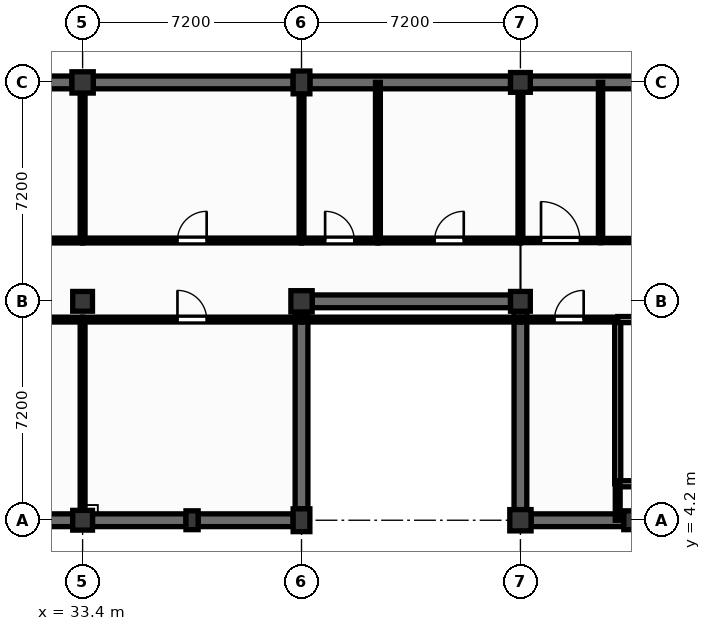
"""IFC4 building model, lengths in metres.
Left out: names, types, materials, properties, quantities, classifications, styles, units other than length and angle.
Written with IfcOpenShell. Run it as: python <this file> out.ifc"""

import sys

from ifc_helpers import new_model, si_unit, direction, frame, frame_2d, origin, origin_2d, place, context, subcontext, project, spatial, rectangle, extrude, element, fill, save


model = new_model("IFC4")
c1 = context("Model", 3, precision=1e-05, world=origin(), true_north=direction((0.0, 1.0)))
c2 = subcontext(c1, "Body", "Model", "MODEL_VIEW")
j1 = project(units=[si_unit("LENGTHUNIT", "METRE"), si_unit("PLANEANGLEUNIT", "RADIAN")], contexts=[c1])
p1 = place(None, origin())
s1 = spatial("IfcSite", under=j1, at=p1, CompositionType="ELEMENT")
p2 = place(p1, origin())
s2 = spatial("IfcBuilding", under=s1, at=p2, CompositionType="ELEMENT")
p3 = place(p2, frame((0.0, 0.0, -4.5)))
s3 = spatial("IfcBuildingStorey", under=s2, at=p3, CompositionType="ELEMENT", Elevation=-4.5)
for number, where, z_axis, x_axis in (
    (1, (33.4, 4.2, 0.0), (0.0, 0.0, 1.0), (1.0, 0.0, 0.0)),
    (2, (33.4, 11.4, 0.0), (0.0, 0.0, 1.0), (1.0, 0.0, 0.0)),
):
    element("IfcColumn", number, at=place(p3, frame(where, z_axis=z_axis, x_axis=x_axis)), inside=s3, PredefinedType="COLUMN", context=c2, shape_type="SweptSolid", body=[
        extrude(rectangle(XDim=0.65, YDim=0.65, at=origin_2d()), origin(), (0.0, 0.0, 1.0), 4.2),
    ])
p4 = place(p3, frame((33.4, 18.6, 0.0), z_axis=(0.0, 0.0, 1.0), x_axis=(1.0, 0.0, 0.0)))
e3 = element("IfcColumn", 3, at=p4, inside=s3, PredefinedType="COLUMN", context=c2, shape_type="SweptSolid", body=[
    extrude(rectangle(XDim=0.7, YDim=0.7, at=origin_2d()), origin(), (0.0, 0.0, 1.0), 4.2),
])
p5 = place(p3, frame((40.6, 4.2, 0.0), z_axis=(0.0, 0.0, 1.0), x_axis=(1.0, 0.0, 0.0)))
e4 = element("IfcColumn", 4, at=p5, inside=s3, PredefinedType="COLUMN", context=c2, shape_type="SweptSolid", body=[
    extrude(rectangle(XDim=0.55, YDim=0.75, at=origin_2d()), origin(), (0.0, 0.0, 1.0), 4.2),
])
p6 = place(p3, frame((40.6, 11.4, 0.0), z_axis=(0.0, 0.0, 1.0), x_axis=(1.0, 0.0, 0.0)))
e5 = element("IfcColumn", 5, at=p6, inside=s3, PredefinedType="COLUMN", context=c2, shape_type="SweptSolid", body=[
    extrude(rectangle(XDim=0.7, YDim=0.7, at=origin_2d()), origin(), (0.0, 0.0, 1.0), 4.2),
])
p7 = place(p3, frame((40.6, 18.6, 0.0), z_axis=(0.0, 0.0, 1.0), x_axis=(1.0, 0.0, 0.0)))
e6 = element("IfcColumn", 6, at=p7, inside=s3, PredefinedType="COLUMN", context=c2, shape_type="SweptSolid", body=[
    extrude(rectangle(XDim=0.55, YDim=0.75, at=origin_2d()), origin(), (0.0, 0.0, 1.0), 4.2),
])
p8 = place(p3, frame((47.8, 4.2, 0.0), z_axis=(0.0, 0.0, 1.0), x_axis=(1.0, 0.0, 0.0)))
e7 = element("IfcColumn", 7, at=p8, inside=s3, PredefinedType="COLUMN", context=c2, shape_type="SweptSolid", body=[
    extrude(rectangle(XDim=0.7, YDim=0.7, at=origin_2d()), origin(), (0.0, 0.0, 1.0), 4.2),
])
for number, where, z_axis, x_axis in (
    (8, (47.8, 11.4, 0.0), (0.0, 0.0, 1.0), (1.0, 0.0, 0.0)),
    (9, (47.8, 18.6, 0.0), (0.0, 0.0, 1.0), (1.0, 0.0, 0.0)),
):
    element("IfcColumn", number, at=place(p3, frame(where, z_axis=z_axis, x_axis=x_axis)), inside=s3, PredefinedType="COLUMN", context=c2, shape_type="SweptSolid", body=[
        extrude(rectangle(XDim=0.65, YDim=0.65, at=origin_2d()), origin(), (0.0, 0.0, 1.0), 4.2),
    ])
for number, where, z_axis, x_axis in (
    (10, (37.0, 4.2, 0.0), (0.0, 0.0, 1.0), (1.0, 0.0, 0.0)),
    (11, (51.4, 4.2, 0.0), (0.0, 0.0, 1.0), (1.0, 0.0, 0.0)),
):
    element("IfcColumn", number, at=place(p3, frame(where, z_axis=z_axis, x_axis=x_axis)), inside=s3, PredefinedType="PILASTER", context=c2, shape_type="SweptSolid", body=[
        extrude(rectangle(XDim=0.4, YDim=0.62, at=origin_2d()), origin(), (0.0, 0.0, 1.0), 4.2),
    ])
p9 = place(p3, frame((26.55, 4.2, 0.0), z_axis=(0.0, 0.0, 1.0), x_axis=(1.0, 0.0, 0.0)))
e12 = element("IfcWall", 12, at=p9, inside=s3, PredefinedType="USERDEFINED", context=c2, shape_type="SweptSolid", body=[
    extrude(rectangle(XDim=6.525, YDim=0.42, at=frame_2d((3.262, 0.0))), origin(), (0.0, 0.0, 1.0), 4.2),
])
p10 = place(p3, frame((26.475, 18.6, 0.0), z_axis=(0.0, 0.0, 1.0), x_axis=(1.0, 0.0, 0.0)))
e13 = element("IfcWall", 13, at=p10, inside=s3, PredefinedType="USERDEFINED", context=c2, shape_type="SweptSolid", body=[
    extrude(rectangle(XDim=6.575, YDim=0.42, at=frame_2d((3.288, 0.0))), origin(), (0.0, 0.0, 1.0), 4.2),
])
p11 = place(p3, frame((33.725, 4.2, 0.0), z_axis=(0.0, 0.0, 1.0), x_axis=(1.0, 0.0, 0.0)))
e14 = element("IfcWall", 14, at=p11, inside=s3, PredefinedType="USERDEFINED", context=c2, shape_type="SweptSolid", body=[
    extrude(rectangle(XDim=3.075, YDim=0.42, at=frame_2d((1.538, 0.0))), origin(), (0.0, 0.0, 1.0), 4.2),
])
p12 = place(p3, frame((37.2, 4.2, 0.0), z_axis=(0.0, 0.0, 1.0), x_axis=(1.0, 0.0, 0.0)))
e15 = element("IfcWall", 15, at=p12, inside=s3, PredefinedType="USERDEFINED", context=c2, shape_type="SweptSolid", body=[
    extrude(rectangle(XDim=3.125, YDim=0.42, at=frame_2d((1.562, 0.0))), origin(), (0.0, 0.0, 1.0), 4.2),
])
p13 = place(p3, frame((40.6, 4.575, 0.0), z_axis=(0.0, 0.0, 1.0), x_axis=(0.0, 1.0, 0.0)))
e16 = element("IfcWall", 16, at=p13, inside=s3, PredefinedType="USERDEFINED", context=c2, shape_type="SweptSolid", body=[
    extrude(rectangle(XDim=6.475, YDim=0.42, at=frame_2d((3.238, 0.0))), origin(), (0.0, 0.0, 1.0), 4.2),
])
p14 = place(p3, frame((33.75, 18.6, 0.0), z_axis=(0.0, 0.0, 1.0), x_axis=(1.0, 0.0, 0.0)))
e17 = element("IfcWall", 17, at=p14, inside=s3, PredefinedType="USERDEFINED", context=c2, shape_type="SweptSolid", body=[
    extrude(rectangle(XDim=6.575, YDim=0.42, at=frame_2d((3.288, 0.0))), origin(), (0.0, 0.0, 1.0), 4.2),
])
p15 = place(p3, frame((40.95, 11.4, 0.0), z_axis=(0.0, 0.0, 1.0), x_axis=(1.0, 0.0, 0.0)))
e18 = element("IfcWall", 18, at=p15, inside=s3, PredefinedType="USERDEFINED", context=c2, shape_type="SweptSolid", body=[
    extrude(rectangle(XDim=6.525, YDim=0.42, at=frame_2d((3.263, 0.0))), origin(), (0.0, 0.0, 1.0), 4.2),
])
p16 = place(p3, frame((40.875, 18.6, 0.0), z_axis=(0.0, 0.0, 1.0), x_axis=(1.0, 0.0, 0.0)))
e19 = element("IfcWall", 19, at=p16, inside=s3, PredefinedType="USERDEFINED", context=c2, shape_type="SweptSolid", body=[
    extrude(rectangle(XDim=6.6, YDim=0.42, at=frame_2d((3.3, 0.0))), origin(), (0.0, 0.0, 1.0), 4.2),
])
p17 = place(p3, frame((48.15, 4.2, 0.0), z_axis=(0.0, 0.0, 1.0), x_axis=(1.0, 0.0, 0.0)))
e20 = element("IfcWall", 20, at=p17, inside=s3, PredefinedType="USERDEFINED", context=c2, shape_type="SweptSolid", body=[
    extrude(rectangle(XDim=3.05, YDim=0.42, at=frame_2d((1.525, 0.0))), origin(), (0.0, 0.0, 1.0), 4.2),
])
for number, where, z_axis, x_axis in (
    (21, (47.8, 4.55, 0.0), (0.0, 0.0, 1.0), (0.0, 1.0, 0.0)),
    (22, (48.125, 18.6, 0.0), (0.0, 0.0, 1.0), (1.0, 0.0, 0.0)),
):
    element("IfcWall", number, at=place(p3, frame(where, z_axis=z_axis, x_axis=x_axis)), inside=s3, PredefinedType="USERDEFINED", context=c2, shape_type="SweptSolid", body=[
        extrude(rectangle(XDim=6.525, YDim=0.42, at=frame_2d((3.262, 0.0))), origin(), (0.0, 0.0, 1.0), 4.2),
    ])
p18 = place(p3, frame((26.2, 13.4, 0.0), z_axis=(0.0, 0.0, 1.0), x_axis=(1.0, 0.0, 0.0)))
e23 = element("IfcWall", 23, at=p18, inside=s3, PredefinedType="PARTITIONING", context=c2, shape_type="SweptSolid", body=[
    extrude(rectangle(XDim=7.2, YDim=0.16, at=frame_2d((3.6, 0.0))), origin(), (0.0, 0.0, 1.0), 4.08),
])
p19 = place(p18, frame((3.12, 0.0, 0.0)))
e24 = element("IfcOpeningElement", 24, at=p19, cuts=e23, PredefinedType="OPENING", context=c2, shape_type="SweptSolid", body=[
    extrude(rectangle(XDim=0.96, YDim=2.1, at=frame_2d((0.48, 1.05))), frame((0.0, 0.09, 0.0), z_axis=(0.0, -1.0, 0.0), x_axis=(1.0, 0.0, 0.0)), (0.0, 0.0, 1.0), 0.18),
])
p20 = place(p3, frame((28.835, 10.8, 0.0), z_axis=(0.0, 0.0, 1.0), x_axis=(1.0, 0.0, 0.0)))
e25 = element("IfcWall", 25, at=p20, inside=s3, PredefinedType="PARTITIONING", context=c2, shape_type="SweptSolid", body=[
    extrude(rectangle(XDim=4.565, YDim=0.16, at=frame_2d((2.282, 0.0))), origin(), (0.0, 0.0, 1.0), 4.08),
])
p21 = place(p20, frame((1.802, 0.0, 0.0)))
e26 = element("IfcOpeningElement", 26, at=p21, cuts=e25, PredefinedType="OPENING", context=c2, shape_type="SweptSolid", body=[
    extrude(rectangle(XDim=0.96, YDim=2.1, at=frame_2d((0.48, 1.05))), frame((0.0, 0.09, 0.0), z_axis=(0.0, -1.0, 0.0), x_axis=(1.0, 0.0, 0.0)), (0.0, 0.0, 1.0), 0.18),
])
p22 = place(p3, frame((33.4, 4.525, 0.0), z_axis=(0.0, 0.0, 1.0), x_axis=(0.0, 1.0, 0.0)))
e27 = element("IfcWall", 27, at=p22, inside=s3, PredefinedType="PARTITIONING", context=c2, shape_type="SweptSolid", body=[
    extrude(rectangle(XDim=6.205, YDim=0.16, at=frame_2d((3.103, 0.0))), origin(), (0.0, 0.0, 1.0), 3.5),
])
p23 = place(p3, frame((33.4, 10.8, 0.0), z_axis=(0.0, 0.0, 1.0), x_axis=(1.0, 0.0, 0.0)))
e28 = element("IfcWall", 28, at=p23, inside=s3, PredefinedType="PARTITIONING", context=c2, shape_type="SweptSolid", body=[
    extrude(rectangle(XDim=7.2, YDim=0.16, at=frame_2d((3.6, 0.0))), origin(), (0.0, 0.0, 1.0), 4.08),
])
p24 = place(p23, frame((3.12, 0.0, 0.0)))
e29 = element("IfcOpeningElement", 29, at=p24, cuts=e28, PredefinedType="OPENING", context=c2, shape_type="SweptSolid", body=[
    extrude(rectangle(XDim=0.96, YDim=2.1, at=frame_2d((0.48, 1.05))), frame((0.0, 0.09, 0.0), z_axis=(0.0, -1.0, 0.0), x_axis=(1.0, 0.0, 0.0)), (0.0, 0.0, 1.0), 0.18),
])
p25 = place(p3, frame((33.4, 13.47, 0.0), z_axis=(0.0, 0.0, 1.0), x_axis=(0.0, 1.0, 0.0)))
e30 = element("IfcWall", 30, at=p25, inside=s3, PredefinedType="PARTITIONING", context=c2, shape_type="SweptSolid", body=[
    extrude(rectangle(XDim=4.78, YDim=0.16, at=frame_2d((2.39, 0.0))), origin(), (0.0, 0.0, 1.0), 3.5),
])
p26 = place(p3, frame((33.4, 13.4, 0.0), z_axis=(0.0, 0.0, 1.0), x_axis=(1.0, 0.0, 0.0)))
e31 = element("IfcWall", 31, at=p26, inside=s3, PredefinedType="PARTITIONING", context=c2, shape_type="SweptSolid", body=[
    extrude(rectangle(XDim=7.2, YDim=0.16, at=frame_2d((3.6, 0.0))), origin(), (0.0, 0.0, 1.0), 4.08),
])
p27 = place(p26, frame((3.12, 0.0, 0.0)))
e32 = element("IfcOpeningElement", 32, at=p27, cuts=e31, PredefinedType="OPENING", context=c2, shape_type="SweptSolid", body=[
    extrude(rectangle(XDim=0.96, YDim=2.1, at=frame_2d((0.48, 1.05))), frame((0.0, 0.09, 0.0), z_axis=(0.0, -1.0, 0.0), x_axis=(1.0, 0.0, 0.0)), (0.0, 0.0, 1.0), 0.18),
])
p28 = place(p3, frame((40.6, 13.47, 0.0), z_axis=(0.0, 0.0, 1.0), x_axis=(0.0, 1.0, 0.0)))
e33 = element("IfcWall", 33, at=p28, inside=s3, PredefinedType="PARTITIONING", context=c2, shape_type="SweptSolid", body=[
    extrude(rectangle(XDim=4.755, YDim=0.16, at=frame_2d((2.377, 0.0))), origin(), (0.0, 0.0, 1.0), 3.5),
])
p29 = place(p3, frame((40.6, 13.4, 0.0), z_axis=(0.0, 0.0, 1.0), x_axis=(1.0, 0.0, 0.0)))
e34 = element("IfcWall", 34, at=p29, inside=s3, PredefinedType="PARTITIONING", context=c2, shape_type="SweptSolid", body=[
    extrude(rectangle(XDim=2.513, YDim=0.16, at=frame_2d((1.256, 0.0))), origin(), (0.0, 0.0, 1.0), 4.08),
])
p30 = place(p29, frame((0.777, 0.0, 0.0)))
e35 = element("IfcOpeningElement", 35, at=p30, cuts=e34, PredefinedType="OPENING", context=c2, shape_type="SweptSolid", body=[
    extrude(rectangle(XDim=0.96, YDim=2.1, at=frame_2d((0.48, 1.05))), frame((0.0, 0.09, 0.0), z_axis=(0.0, -1.0, 0.0), x_axis=(1.0, 0.0, 0.0)), (0.0, 0.0, 1.0), 0.18),
])
p31 = place(p3, frame((43.113, 13.47, 0.0), z_axis=(0.0, 0.0, 1.0), x_axis=(0.0, 1.0, 0.0)))
e36 = element("IfcWall", 36, at=p31, inside=s3, PredefinedType="PARTITIONING", context=c2, shape_type="SweptSolid", body=[
    extrude(rectangle(XDim=5.13, YDim=0.16, at=frame_2d((2.565, 0.0))), origin(), (0.0, 0.0, 1.0), 4.08),
])
p32 = place(p3, frame((43.113, 13.4, 0.0), z_axis=(0.0, 0.0, 1.0), x_axis=(1.0, 0.0, 0.0)))
e37 = element("IfcWall", 37, at=p32, inside=s3, PredefinedType="PARTITIONING", context=c2, shape_type="SweptSolid", body=[
    extrude(rectangle(XDim=4.687, YDim=0.16, at=frame_2d((2.344, 0.0))), origin(), (0.0, 0.0, 1.0), 4.08),
])
p33 = place(p32, frame((1.864, 0.0, 0.0)))
e38 = element("IfcOpeningElement", 38, at=p33, cuts=e37, PredefinedType="OPENING", context=c2, shape_type="SweptSolid", body=[
    extrude(rectangle(XDim=0.96, YDim=2.1, at=frame_2d((0.48, 1.05))), frame((0.0, 0.09, 0.0), z_axis=(0.0, -1.0, 0.0), x_axis=(1.0, 0.0, 0.0)), (0.0, 0.0, 1.0), 0.18),
])
p34 = place(p3, frame((47.8, 10.8, 0.0), z_axis=(0.0, 0.0, 1.0), x_axis=(1.0, 0.0, 0.0)))
e39 = element("IfcWall", 39, at=p34, inside=s3, PredefinedType="PARTITIONING", context=c2, shape_type="SweptSolid", body=[
    extrude(rectangle(XDim=3.2, YDim=0.16, at=frame_2d((1.6, 0.0))), origin(), (0.0, 0.0, 1.0), 4.08),
])
p35 = place(p34, frame((1.12, 0.0, 0.0)))
e40 = element("IfcOpeningElement", 40, at=p35, cuts=e39, PredefinedType="OPENING", context=c2, shape_type="SweptSolid", body=[
    extrude(rectangle(XDim=0.96, YDim=2.1, at=frame_2d((0.48, 1.05))), frame((0.0, 0.09, 0.0), z_axis=(0.0, -1.0, 0.0), x_axis=(1.0, 0.0, 0.0)), (0.0, 0.0, 1.0), 0.18),
])
p36 = place(p3, frame((47.8, 13.47, 0.0), z_axis=(0.0, 0.0, 1.0), x_axis=(0.0, 1.0, 0.0)))
e41 = element("IfcWall", 41, at=p36, inside=s3, PredefinedType="PARTITIONING", context=c2, shape_type="SweptSolid", body=[
    extrude(rectangle(XDim=4.805, YDim=0.16, at=frame_2d((2.402, 0.0))), origin(), (0.0, 0.0, 1.0), 3.5),
])
p37 = place(p3, frame((47.8, 13.4, 0.0), z_axis=(0.0, 0.0, 1.0), x_axis=(1.0, 0.0, 0.0)))
e42 = element("IfcWall", 42, at=p37, inside=s3, PredefinedType="PARTITIONING", context=c2, shape_type="SweptSolid", body=[
    extrude(rectangle(XDim=2.635, YDim=0.14, at=frame_2d((1.317, 0.0))), origin(), (0.0, 0.0, 1.0), 4.08),
])
p38 = place(p37, frame((0.677, 0.0, 0.0)))
e43 = element("IfcOpeningElement", 43, at=p38, cuts=e42, PredefinedType="OPENING", context=c2, shape_type="SweptSolid", body=[
    extrude(rectangle(XDim=1.28, YDim=2.2, at=frame_2d((0.64, 1.1))), frame((0.0, 0.08, 0.0), z_axis=(0.0, -1.0, 0.0), x_axis=(1.0, 0.0, 0.0)), (0.0, 0.0, 1.0), 0.16),
])
p39 = place(p3, frame((50.435, 13.47, 0.0), z_axis=(0.0, 0.0, 1.0), x_axis=(0.0, 1.0, 0.0)))
e44 = element("IfcWall", 44, at=p39, inside=s3, PredefinedType="PARTITIONING", context=c2, shape_type="SweptSolid", body=[
    extrude(rectangle(XDim=5.13, YDim=0.14, at=frame_2d((2.565, 0.0))), origin(), (0.0, 0.0, 1.0), 4.08),
])
p40 = place(p3, frame((50.435, 13.4, 0.0), z_axis=(0.0, 0.0, 1.0), x_axis=(1.0, 0.0, 0.0)))
e45 = element("IfcWall", 45, at=p40, inside=s3, PredefinedType="PARTITIONING", context=c2, shape_type="SweptSolid", body=[
    extrude(rectangle(XDim=4.565, YDim=0.14, at=frame_2d((2.282, 0.0))), origin(), (0.0, 0.0, 1.0), 4.08),
])
p41 = place(p40, frame((1.833, 0.0, 0.0)))
e46 = element("IfcOpeningElement", 46, at=p41, cuts=e45, PredefinedType="OPENING", context=c2, shape_type="SweptSolid", body=[
    extrude(rectangle(XDim=0.9, YDim=2.1, at=frame_2d((0.45, 1.05))), frame((0.0, 0.08, 0.0), z_axis=(0.0, -1.0, 0.0), x_axis=(1.0, 0.0, 0.0)), (0.0, 0.0, 1.0), 0.16),
])
p42 = place(p3, frame((51.0, 5.4, 0.0), z_axis=(0.0, 0.0, 1.0), x_axis=(0.0, 1.0, 0.0)))
e47 = element("IfcWall", 47, at=p42, inside=s3, PredefinedType="PARTITIONING", context=c2, shape_type="SweptSolid", body=[
    extrude(rectangle(XDim=5.33, YDim=0.2, at=frame_2d((2.665, 0.0))), origin(), (0.0, 0.0, 1.0), 4.08),
])
p43 = place(p3, frame((51.0, 10.8, 0.0), z_axis=(0.0, 0.0, 1.0), x_axis=(1.0, 0.0, 0.0)))
e48 = element("IfcWall", 48, at=p43, inside=s3, PredefinedType="PARTITIONING", context=c2, shape_type="SweptSolid", body=[
    extrude(rectangle(XDim=4.29, YDim=0.2, at=frame_2d((2.145, 0.0))), origin(), (0.0, 0.0, 1.0), 4.08),
])
p44 = place(p43, frame((1.405, 0.0, 0.0)))
e49 = element("IfcOpeningElement", 49, at=p44, cuts=e48, PredefinedType="OPENING", context=c2, shape_type="SweptSolid", body=[
    extrude(rectangle(XDim=1.48, YDim=2.25, at=frame_2d((0.74, 1.125))), frame((0.0, 0.11, 0.0), z_axis=(0.0, -1.0, 0.0), x_axis=(1.0, 0.0, 0.0)), (0.0, 0.0, 1.0), 0.22),
])
p45 = place(p3, frame((51.0, 5.4, 0.0), z_axis=(0.0, 0.0, 1.0), x_axis=(1.0, 0.0, 0.0)))
e50 = element("IfcWall", 50, at=p45, inside=s3, PredefinedType="PARTITIONING", context=c2, shape_type="SweptSolid", body=[
    extrude(rectangle(XDim=4.26, YDim=0.2, at=frame_2d((2.13, 0.0))), origin(), (0.0, 0.0, 1.0), 4.08),
])
p46 = place(p3, frame((40.6, 10.8, 0.0), z_axis=(0.0, 0.0, 1.0), x_axis=(1.0, 0.0, 0.0)))
e51 = element("IfcWall", 51, at=p46, inside=s3, PredefinedType="PARTITIONING", context=c2, shape_type="SweptSolid", body=[
    extrude(rectangle(XDim=7.2, YDim=0.16, at=frame_2d((3.6, 0.0))), origin(), (0.0, 0.0, 1.0), 4.08),
])
p47 = place(p3, frame((51.0, 4.2, 0.0), z_axis=(0.0, 0.0, 1.0), x_axis=(0.0, 1.0, 0.0)))
e52 = element("IfcWall", 52, at=p47, inside=s3, PredefinedType="PARTITIONING", context=c2, shape_type="SweptSolid", body=[
    extrude(rectangle(XDim=1.2, YDim=0.16, at=frame_2d((0.6, 0.0))), origin(), (0.0, 0.0, 1.0), 4.08),
])
p48 = place(p35, origin())
e53 = element("IfcDoor", 53, at=p48, inside=s3, OperationType="SINGLE_SWING_RIGHT", PredefinedType="DOOR", context=c2, shape_type="SweptSolid", body=[
    extrude(rectangle(XDim=0.96, YDim=2.1, at=frame_2d((0.48, 1.05))), frame((0.0, 0.025, 0.0), z_axis=(0.0, -1.0, 0.0), x_axis=(1.0, 0.0, 0.0)), (0.0, 0.0, 1.0), 0.05),
])
fill(e40, e53)
p49 = place(p38, origin())
e54 = element("IfcDoor", 54, at=p49, inside=s3, OperationType="SINGLE_SWING_LEFT", PredefinedType="DOOR", context=c2, shape_type="SweptSolid", body=[
    extrude(rectangle(XDim=1.28, YDim=2.2, at=frame_2d((0.64, 1.1))), frame((0.0, 0.025, 0.0), z_axis=(0.0, -1.0, 0.0), x_axis=(1.0, 0.0, 0.0)), (0.0, 0.0, 1.0), 0.05),
])
fill(e43, e54)
p50 = place(p24, origin())
e55 = element("IfcDoor", 55, at=p50, inside=s3, OperationType="SINGLE_SWING_LEFT", PredefinedType="DOOR", context=c2, shape_type="SweptSolid", body=[
    extrude(rectangle(XDim=0.96, YDim=2.1, at=frame_2d((0.48, 1.05))), frame((0.0, 0.025, 0.0), z_axis=(0.0, -1.0, 0.0), x_axis=(1.0, 0.0, 0.0)), (0.0, 0.0, 1.0), 0.05),
])
fill(e29, e55)
p51 = place(p27, origin())
e56 = element("IfcDoor", 56, at=p51, inside=s3, OperationType="SINGLE_SWING_RIGHT", PredefinedType="DOOR", context=c2, shape_type="SweptSolid", body=[
    extrude(rectangle(XDim=0.96, YDim=2.1, at=frame_2d((0.48, 1.05))), frame((0.0, 0.025, 0.0), z_axis=(0.0, -1.0, 0.0), x_axis=(1.0, 0.0, 0.0)), (0.0, 0.0, 1.0), 0.05),
])
fill(e32, e56)
p52 = place(p30, origin())
e57 = element("IfcDoor", 57, at=p52, inside=s3, OperationType="SINGLE_SWING_LEFT", PredefinedType="DOOR", context=c2, shape_type="SweptSolid", body=[
    extrude(rectangle(XDim=0.96, YDim=2.1, at=frame_2d((0.48, 1.05))), frame((0.0, 0.025, 0.0), z_axis=(0.0, -1.0, 0.0), x_axis=(1.0, 0.0, 0.0)), (0.0, 0.0, 1.0), 0.05),
])
fill(e35, e57)
p53 = place(p33, origin())
e58 = element("IfcDoor", 58, at=p53, inside=s3, OperationType="SINGLE_SWING_RIGHT", PredefinedType="DOOR", context=c2, shape_type="SweptSolid", body=[
    extrude(rectangle(XDim=0.96, YDim=2.1, at=frame_2d((0.48, 1.05))), frame((0.0, 0.025, 0.0), z_axis=(0.0, -1.0, 0.0), x_axis=(1.0, 0.0, 0.0)), (0.0, 0.0, 1.0), 0.05),
])
fill(e38, e58)
save(model, sys.argv[1])
